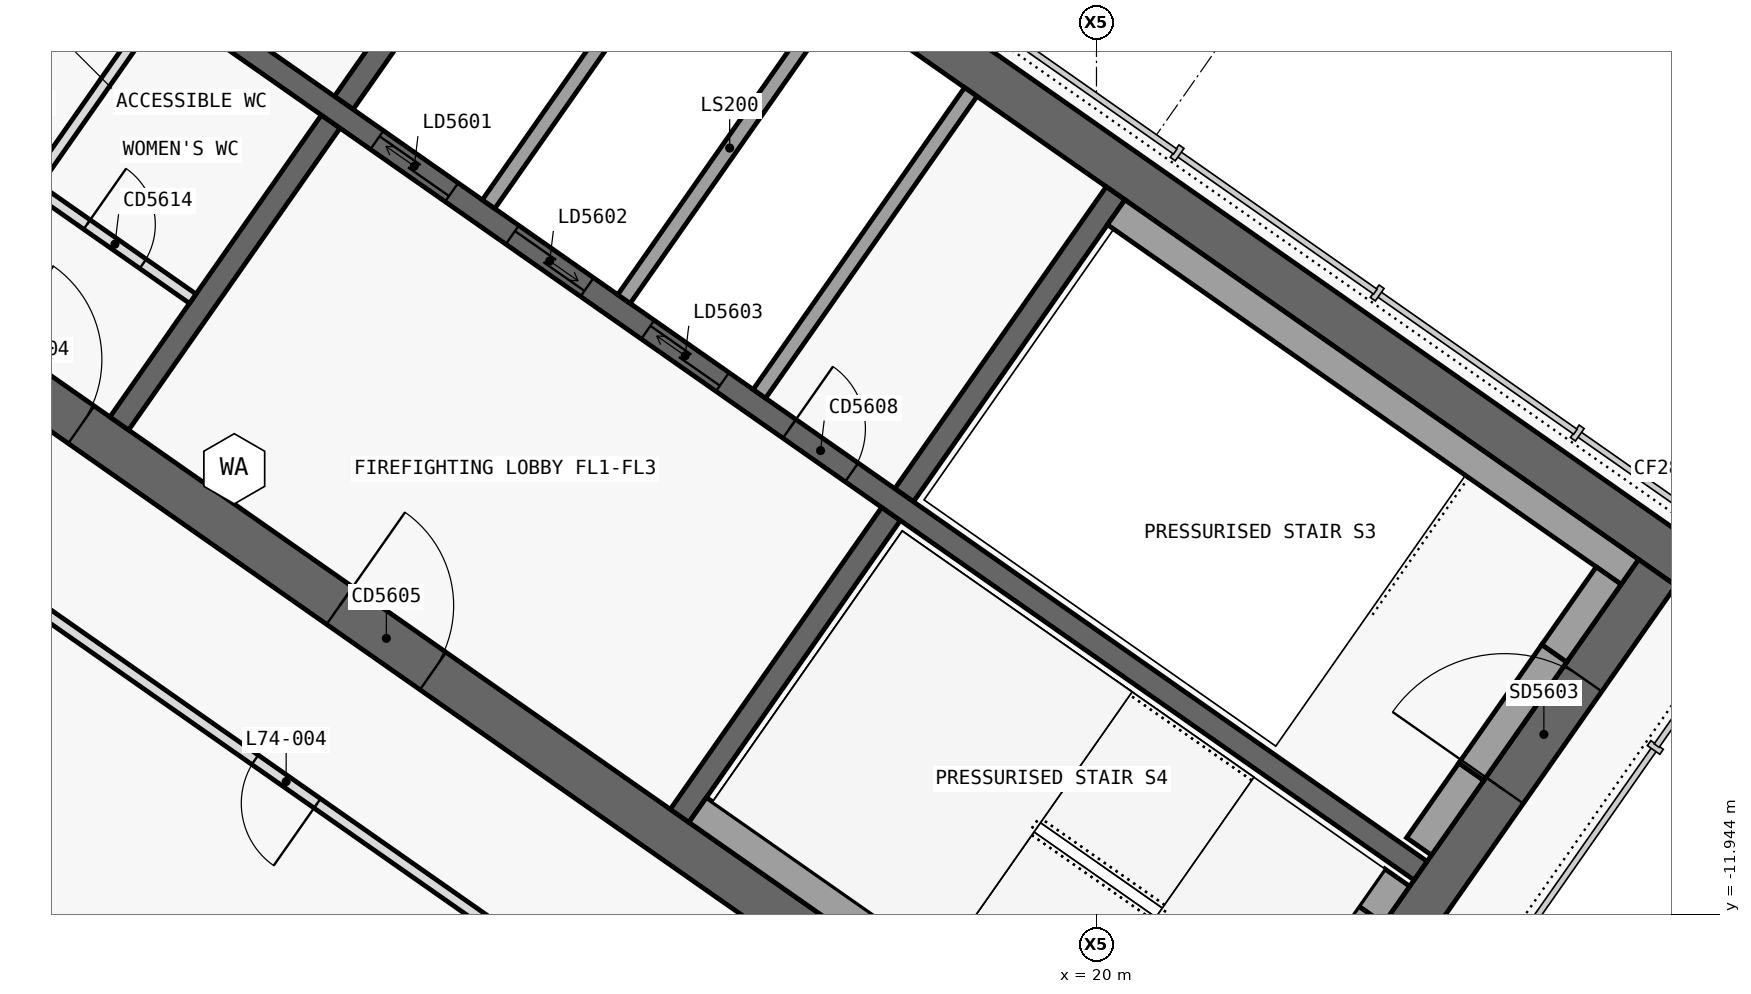
"""IFC4 building model, lengths in metres.
Left out: names, types, materials, properties, quantities, classifications, styles, units other than length and angle.
Written with IfcOpenShell. Run it as: python <this file> out.ifc"""

import sys

from ifc_helpers import new_model, si_unit, direction, frame, frame_2d, origin, place, context, subcontext, project, spatial, polyline, rectangle, outline, extrude, element, fill, save


model = new_model("IFC4")
c1 = context("Model", 3, precision=1e-05, world=origin(), true_north=direction((0.0, 1.0)))
c2 = subcontext(c1, "Body", "Model", "MODEL_VIEW")
j1 = project(units=[si_unit("LENGTHUNIT", "METRE"), si_unit("PLANEANGLEUNIT", "RADIAN")], contexts=[c1])
p1 = place(None, origin())
s1 = spatial("IfcSite", under=j1, at=p1, CompositionType="ELEMENT")
p2 = place(p1, origin())
s2 = spatial("IfcBuilding", under=s1, at=p2, CompositionType="ELEMENT")
p3 = place(p2, frame((0.0, 0.0, 313.3)))
s3 = spatial("IfcBuildingStorey", under=s2, at=p3, CompositionType="ELEMENT", Elevation=313.3)
p4 = place(p3, frame((0.028, 12.066, 0.0), z_axis=(0.0, 0.0, 1.0), x_axis=(0.819151382952, -0.573577380837, 0.0)))
e1 = element("IfcWall", 1, at=p4, inside=s3, PredefinedType="SHEAR", context=c2, shape_type="SweptSolid", body=[
    extrude(outline(polyline([(33.898, 0.3), (0.0, 0.3), (0.42, -0.3), (33.898, -0.3), (33.898, 0.3)])), origin(), (0.0, 0.0, 1.0), 5.5),
])
p5 = place(p3, frame((0.028, -0.874, 0.0), z_axis=(0.0, 0.0, 1.0), x_axis=(0.819150035022, -0.573579305871, 0.0)))
e2 = element("IfcWall", 2, at=p5, inside=s3, PredefinedType="SHEAR", context=c2, shape_type="SweptSolid", body=[
    extrude(outline(polyline([(26.476, 0.3), (0.0, 0.3), (0.42, -0.3), (26.476, -0.3), (26.476, 0.3)])), origin(), (0.0, 0.0, 1.0), 5.5),
])
p6 = place(p5, frame((6.576, 0.0, 0.0)))
e3 = element("IfcOpeningElement", 3, at=p6, cuts=e2, PredefinedType="OPENING", context=c2, shape_type="SweptSolid", body=[
    extrude(rectangle(XDim=1.5, YDim=2.1, at=frame_2d((0.75, 1.05))), frame((0.0, 0.31, 0.0), z_axis=(0.0, -1.0, 0.0), x_axis=(1.0, 0.0, 0.0)), (0.0, 0.0, 1.0), 0.62),
])
p7 = place(p5, frame((12.226, 0.0, 0.0)))
e4 = element("IfcOpeningElement", 4, at=p7, cuts=e2, PredefinedType="OPENING", context=c2, shape_type="SweptSolid", body=[
    extrude(rectangle(XDim=1.5, YDim=2.1, at=frame_2d((0.75, 1.05))), frame((0.0, 0.31, 0.0), z_axis=(0.0, -1.0, 0.0), x_axis=(1.0, 0.0, 0.0)), (0.0, 0.0, 1.0), 0.62),
])
p8 = place(p3, frame((21.642, -15.642, 0.0), z_axis=(0.0, 0.0, 1.0), x_axis=(0.573586866468, 0.819144740944, 0.0)))
e5 = element("IfcWall", 5, at=p8, inside=s3, PredefinedType="SHEAR", context=c2, shape_type="SweptSolid", body=[
    extrude(outline(polyline([(10.0, 0.3), (0.0, 0.3), (0.0, -0.3), (10.0, -0.3), (10.0, 0.3)])), origin(), (0.0, 0.0, 1.0), 5.5),
])
p9 = place(p8, frame((6.5, 0.0, 0.0)))
e6 = element("IfcOpeningElement", 6, at=p9, cuts=e5, PredefinedType="OPENING", context=c2, shape_type="SweptSolid", body=[
    extrude(rectangle(XDim=1.8, YDim=2.1, at=frame_2d((0.9, 1.05))), frame((0.0, 0.31, 0.0), z_axis=(0.0, -1.0, 0.0), x_axis=(1.0, 0.0, 0.0)), (0.0, 0.0, 1.0), 0.62),
])
p10 = place(p8, frame((2.3, 0.0, 0.0)))
e7 = element("IfcOpeningElement", 7, at=p10, cuts=e5, PredefinedType="OPENING", context=c2, shape_type="SweptSolid", body=[
    extrude(rectangle(XDim=1.8, YDim=2.1, at=frame_2d((0.9, 1.05))), frame((0.0, 0.31, 0.0), z_axis=(0.0, -1.0, 0.0), x_axis=(1.0, 0.0, 0.0)), (0.0, 0.0, 1.0), 0.62),
])
p11 = place(p3, frame((7.143, -5.49, 0.0), z_axis=(0.0, 0.0, 1.0), x_axis=(0.573617744349, 0.819123118565, 0.0)))
e8 = element("IfcWall", 8, at=p11, inside=s3, PredefinedType="SHEAR", context=c2, shape_type="SweptSolid", body=[
    extrude(outline(polyline([(0.0, 0.15), (0.0, -0.15), (4.85, -0.15), (4.85, 0.15), (0.0, 0.15)])), origin(), (0.0, 0.0, 1.0), 5.5),
])
p12 = place(p3, frame((10.097, -1.271, 0.0), z_axis=(0.0, 0.0, 1.0), x_axis=(0.573560315113, 0.819163332265, 0.0)))
e9 = element("IfcWall", 9, at=p12, inside=s3, PredefinedType="SHEAR", context=c2, shape_type="SweptSolid", body=[
    extrude(outline(polyline([(4.85, -0.15), (4.85, 0.15), (0.0, 0.15), (0.0, -0.15), (4.85, -0.15)])), origin(), (0.0, 0.0, 1.0), 5.5),
])
p13 = place(p3, frame((14.515, -10.652, 0.0), z_axis=(0.0, 0.0, 1.0), x_axis=(0.573560315113, 0.819163332265, 0.0)))
e10 = element("IfcWall", 10, at=p13, inside=s3, PredefinedType="SHEAR", context=c2, shape_type="SweptSolid", body=[
    extrude(outline(polyline([(0.0, 0.15), (0.0, -0.15), (4.85, -0.15), (4.85, 0.15), (0.0, 0.15)])), origin(), (0.0, 0.0, 1.0), 5.5),
])
p14 = place(p3, frame((17.469, -6.433, 0.0), z_axis=(0.0, 0.0, 1.0), x_axis=(0.573594092424, 0.81913968109, 0.0)))
e11 = element("IfcWall", 11, at=p14, inside=s3, PredefinedType="SHEAR", context=c2, shape_type="SweptSolid", body=[
    extrude(outline(polyline([(4.85, -0.15), (4.85, 0.15), (0.0, 0.15), (0.0, -0.15), (4.85, -0.15)])), origin(), (0.0, 0.0, 1.0), 5.5),
])
p15 = place(p3, frame((2.638, 3.768, 0.0), z_axis=(0.0, 0.0, 1.0), x_axis=(0.819155014212, -0.573572194837, 0.0)))
e12 = element("IfcWall", 12, at=p15, inside=s3, PredefinedType="SHEAR", context=c2, shape_type="SweptSolid", body=[
    extrude(outline(polyline([(0.0, 0.15), (0.0, -0.15), (26.4, -0.15), (26.4, 0.15), (0.0, 0.15)])), origin(), (0.0, 0.0, 1.0), 5.5),
])
p16 = place(p15, frame((9.637, 0.0, 0.0)))
e13 = element("IfcOpeningElement", 13, at=p16, cuts=e12, PredefinedType="OPENING", context=c2, shape_type="SweptSolid", body=[
    extrude(rectangle(XDim=1.2, YDim=2.1, at=frame_2d((0.6, 1.05))), frame((0.0, 0.16, 0.0), z_axis=(0.0, -1.0, 0.0), x_axis=(1.0, 0.0, 0.0)), (0.0, 0.0, 1.0), 0.32),
])
p17 = place(p15, frame((11.812, 0.0, 0.0)))
e14 = element("IfcOpeningElement", 14, at=p17, cuts=e12, PredefinedType="OPENING", context=c2, shape_type="SweptSolid", body=[
    extrude(rectangle(XDim=1.2, YDim=2.1, at=frame_2d((0.6, 1.05))), frame((0.0, 0.16, 0.0), z_axis=(0.0, -1.0, 0.0), x_axis=(1.0, 0.0, 0.0)), (0.0, 0.0, 1.0), 0.32),
])
p18 = place(p15, frame((13.988, 0.0, 0.0)))
e15 = element("IfcOpeningElement", 15, at=p18, cuts=e12, PredefinedType="OPENING", context=c2, shape_type="SweptSolid", body=[
    extrude(rectangle(XDim=1.2, YDim=2.1, at=frame_2d((0.6, 1.05))), frame((0.0, 0.16, 0.0), z_axis=(0.0, -1.0, 0.0), x_axis=(1.0, 0.0, 0.0)), (0.0, 0.0, 1.0), 0.32),
])
p19 = place(p15, frame((16.262, 0.0, 0.0)))
e16 = element("IfcOpeningElement", 16, at=p19, cuts=e12, PredefinedType="OPENING", context=c2, shape_type="SweptSolid", body=[
    extrude(rectangle(XDim=1.0, YDim=2.1, at=frame_2d((0.5, 1.05))), frame((0.0, 0.16, 0.0), z_axis=(0.0, -1.0, 0.0), x_axis=(1.0, 0.0, 0.0)), (0.0, 0.0, 1.0), 0.32),
])
p20 = place(p3, frame((12.001, -2.605, 0.0), z_axis=(0.0, 0.0, 1.0), x_axis=(0.573560315113, 0.819163332265, 0.0)))
e17 = element("IfcWall", 17, at=p20, inside=s3, PredefinedType="SOLIDWALL", context=c2, shape_type="SweptSolid", body=[
    extrude(rectangle(XDim=4.85, YDim=0.2, at=frame_2d((2.425, 0.0))), origin(), (0.0, 0.0, 1.0), 5.22),
])
p21 = place(p3, frame((13.783, -3.852, 0.0), z_axis=(0.0, 0.0, 1.0), x_axis=(0.573594092424, 0.81913968109, 0.0)))
e18 = element("IfcWall", 18, at=p21, inside=s3, PredefinedType="SOLIDWALL", context=c2, shape_type="SweptSolid", body=[
    extrude(rectangle(XDim=4.85, YDim=0.2, at=frame_2d((2.425, 0.0))), origin(), (0.0, 0.0, 1.0), 5.22),
])
p22 = place(p3, frame((15.565, -5.1, 0.0), z_axis=(0.0, 0.0, 1.0), x_axis=(0.573560315113, 0.819163332265, 0.0)))
e19 = element("IfcWall", 19, at=p22, inside=s3, PredefinedType="SOLIDWALL", context=c2, shape_type="SweptSolid", body=[
    extrude(rectangle(XDim=4.85, YDim=0.2, at=frame_2d((2.425, 0.0))), origin(), (0.0, 0.0, 1.0), 5.22),
])
p23 = place(p3, frame((1.516, 0.77, 0.0), z_axis=(0.0, 0.0, 1.0), x_axis=(0.819146424436, -0.573584462249, 0.0)))
e20 = element("IfcWall", 20, at=p23, inside=s3, PredefinedType="PARTITIONING", context=c2, shape_type="SweptSolid", body=[
    extrude(rectangle(XDim=8.05, YDim=0.15, at=frame_2d((4.025, 0.0))), origin(), (0.0, 0.0, 1.0), 5.22),
])
p24 = place(p23, frame((0.7, 0.0, 0.0)))
e21 = element("IfcOpeningElement", 21, at=p24, cuts=e20, PredefinedType="OPENING", context=c2, shape_type="SweptSolid", body=[
    extrude(rectangle(XDim=0.9, YDim=2.1, at=frame_2d((0.45, 1.05))), frame((0.0, 0.085, 0.0), z_axis=(0.0, -1.0, 0.0), x_axis=(1.0, 0.0, 0.0)), (0.0, 0.0, 1.0), 0.17),
])
p25 = place(p23, frame((2.6, 0.0, 0.0)))
e22 = element("IfcOpeningElement", 22, at=p25, cuts=e20, PredefinedType="OPENING", context=c2, shape_type="SweptSolid", body=[
    extrude(rectangle(XDim=0.8, YDim=2.1, at=frame_2d((0.4, 1.05))), frame((0.0, 0.085, 0.0), z_axis=(0.0, -1.0, 0.0), x_axis=(1.0, 0.0, 0.0)), (0.0, 0.0, 1.0), 0.17),
])
p26 = place(p23, frame((4.1, 0.0, 0.0)))
e23 = element("IfcOpeningElement", 23, at=p26, cuts=e20, PredefinedType="OPENING", context=c2, shape_type="SweptSolid", body=[
    extrude(rectangle(XDim=0.9, YDim=2.1, at=frame_2d((0.45, 1.05))), frame((0.0, 0.085, 0.0), z_axis=(0.0, -1.0, 0.0), x_axis=(1.0, 0.0, 0.0)), (0.0, 0.0, 1.0), 0.17),
])
p27 = place(p23, frame((6.35, 0.0, 0.0)))
e24 = element("IfcOpeningElement", 24, at=p27, cuts=e20, PredefinedType="OPENING", context=c2, shape_type="SweptSolid", body=[
    extrude(rectangle(XDim=0.9, YDim=2.1, at=frame_2d((0.45, 1.05))), frame((0.0, 0.085, 0.0), z_axis=(0.0, -1.0, 0.0), x_axis=(1.0, 0.0, 0.0)), (0.0, 0.0, 1.0), 0.17),
])
p28 = place(p3, frame((6.044, -2.309, 0.0), z_axis=(0.0, 0.0, 1.0), x_axis=(0.573564930514, 0.819160100642, 0.0)))
e25 = element("IfcWall", 25, at=p28, inside=s3, PredefinedType="PARTITIONING", context=c2, shape_type="SweptSolid", body=[
    extrude(rectangle(XDim=2.875, YDim=0.15, at=frame_2d((1.438, 0.0))), origin(), (0.0, 0.0, 1.0), 5.22),
])
p29 = place(p3, frame((20.259, -2.71, 0.0), z_axis=(0.0, 0.0, 1.0), x_axis=(0.81914849389, -0.573581506813, 0.0)))
e26 = element("IfcWall", 26, at=p29, inside=s3, PredefinedType="SOLIDWALL", context=c2, shape_type="SweptSolid", body=[
    extrude(rectangle(XDim=8.25, YDim=0.4, at=frame_2d((4.125, 0.0))), origin(), (0.0, 0.0, 1.0), 5.22),
])
p30 = place(p3, frame((24.244, -11.055, 0.0), z_axis=(0.0, 0.0, 1.0), x_axis=(0.573571582932, 0.819155442668, 0.0)))
e27 = element("IfcWall", 27, at=p30, inside=s3, PredefinedType="SOLIDWALL", context=c2, shape_type="SweptSolid", body=[
    extrude(rectangle(XDim=1.2, YDim=0.4, at=frame_2d((0.6, 0.0))), origin(), (0.0, 0.0, 1.0), 5.22),
])
p31 = place(p3, frame((26.022, -8.515, 0.0), z_axis=(0.0, 0.0, 1.0), x_axis=(0.573619628835, 0.819121798889, 0.0)))
e28 = element("IfcWall", 28, at=p31, inside=s3, PredefinedType="SOLIDWALL", context=c2, shape_type="SweptSolid", body=[
    extrude(rectangle(XDim=1.25, YDim=0.4, at=frame_2d((0.625, 0.0))), origin(), (0.0, 0.0, 1.0), 5.22),
])
p32 = place(p3, frame((24.932, -10.072, 2.15), z_axis=(0.0, 0.0, 1.0), x_axis=(0.573591692345, 0.819141361715, 0.0)))
e29 = element("IfcWall", 29, at=p32, inside=s3, PredefinedType="SOLIDWALL", context=c2, shape_type="SweptSolid", body=[
    extrude(rectangle(XDim=1.9, YDim=0.4, at=frame_2d((0.95, 0.0))), origin(), (0.0, 0.0, 1.0), 3.07),
])
p33 = place(p3, frame((14.753, -10.574, 0.0), z_axis=(0.0, 0.0, 1.0), x_axis=(0.819158229677, -0.573567602601, 0.0)))
e30 = element("IfcWall", 30, at=p33, inside=s3, PredefinedType="SOLIDWALL", context=c2, shape_type="SweptSolid", body=[
    extrude(rectangle(XDim=8.25, YDim=0.4, at=frame_2d((4.125, 0.0))), origin(), (0.0, 0.0, 1.0), 5.22),
])
p34 = place(p3, frame((23.613, -11.956, 0.0), z_axis=(0.0, 0.0, 1.0), x_axis=(0.573435029941, 0.819251039936, 0.0)))
e31 = element("IfcWall", 31, at=p34, inside=s3, PredefinedType="SOLIDWALL", context=c2, shape_type="SweptSolid", body=[
    extrude(rectangle(XDim=0.6, YDim=0.4, at=frame_2d((0.3, 0.0))), origin(), (0.0, 0.0, 1.0), 5.22),
])
p35 = place(p3, frame((22.523, -13.512, 2.15), z_axis=(0.0, 0.0, 1.0), x_axis=(0.573591692345, 0.819141361715, 0.0)))
e32 = element("IfcWall", 32, at=p35, inside=s3, PredefinedType="SOLIDWALL", context=c2, shape_type="SweptSolid", body=[
    extrude(rectangle(XDim=1.9, YDim=0.4, at=frame_2d((0.95, 0.0))), origin(), (0.0, 0.0, 1.0), 3.07),
])
p36 = place(p3, frame((13.026, -12.783, 0.0), z_axis=(0.0, 0.0, 1.0), x_axis=(-0.81915291695, 0.57357519006, 0.0)))
e33 = element("IfcWall", 33, at=p36, inside=s3, PredefinedType="PARTITIONING", context=c2, shape_type="SweptSolid", body=[
    extrude(rectangle(XDim=9.002, YDim=0.15, at=frame_2d((4.501, 0.0))), origin(), (0.0, 0.0, 1.0), 5.2),
])
p37 = place(p36, frame((4.001, 0.0, 0.0)))
e34 = element("IfcOpeningElement", 34, at=p37, cuts=e33, PredefinedType="OPENING", context=c2, shape_type="SweptSolid", body=[
    extrude(rectangle(XDim=1.0, YDim=2.1, at=frame_2d((0.5, 1.05))), frame((0.0, 0.085, 0.0), z_axis=(0.0, -1.0, 0.0), x_axis=(1.0, 0.0, 0.0)), (0.0, 0.0, 1.0), 0.17),
])
p38 = place(p16, origin())
e35 = element("IfcDoor", 35, at=p38, inside=s3, OperationType="SLIDING_TO_LEFT", PredefinedType="DOOR", context=c2, shape_type="SweptSolid", body=[
    extrude(rectangle(XDim=1.2, YDim=2.1, at=frame_2d((0.6, 1.05))), frame((0.0, 0.025, 0.0), z_axis=(0.0, -1.0, 0.0), x_axis=(1.0, 0.0, 0.0)), (0.0, 0.0, 1.0), 0.05),
])
fill(e13, e35)
p39 = place(p17, origin())
e36 = element("IfcDoor", 36, at=p39, inside=s3, OperationType="SLIDING_TO_RIGHT", PredefinedType="DOOR", context=c2, shape_type="SweptSolid", body=[
    extrude(rectangle(XDim=1.2, YDim=2.1, at=frame_2d((0.6, 1.05))), frame((0.0, 0.025, 0.0), z_axis=(0.0, -1.0, 0.0), x_axis=(1.0, 0.0, 0.0)), (0.0, 0.0, 1.0), 0.05),
])
fill(e14, e36)
p40 = place(p18, origin())
e37 = element("IfcDoor", 37, at=p40, inside=s3, OperationType="SLIDING_TO_LEFT", PredefinedType="DOOR", context=c2, shape_type="SweptSolid", body=[
    extrude(rectangle(XDim=1.2, YDim=2.1, at=frame_2d((0.6, 1.05))), frame((0.0, 0.025, 0.0), z_axis=(0.0, -1.0, 0.0), x_axis=(1.0, 0.0, 0.0)), (0.0, 0.0, 1.0), 0.05),
])
fill(e15, e37)
p41 = place(p19, origin())
e38 = element("IfcDoor", 38, at=p41, inside=s3, OperationType="SINGLE_SWING_RIGHT", PredefinedType="DOOR", context=c2, shape_type="SweptSolid", body=[
    extrude(rectangle(XDim=1.0, YDim=2.1, at=frame_2d((0.5, 1.05))), frame((0.0, 0.025, 0.0), z_axis=(0.0, -1.0, 0.0), x_axis=(1.0, 0.0, 0.0)), (0.0, 0.0, 1.0), 0.05),
])
fill(e16, e38)
p42 = place(p27, origin())
e39 = element("IfcDoor", 39, at=p42, inside=s3, OperationType="SINGLE_SWING_RIGHT", PredefinedType="DOOR", context=c2, shape_type="SweptSolid", body=[
    extrude(rectangle(XDim=0.9, YDim=2.1, at=frame_2d((0.45, 1.05))), frame((0.0, 0.025, 0.0), z_axis=(0.0, -1.0, 0.0), x_axis=(1.0, 0.0, 0.0)), (0.0, 0.0, 1.0), 0.05),
])
fill(e24, e39)
p43 = place(p6, origin())
e40 = element("IfcDoor", 40, at=p43, inside=s3, OperationType="SINGLE_SWING_RIGHT", PredefinedType="DOOR", context=c2, shape_type="SweptSolid", body=[
    extrude(rectangle(XDim=1.5, YDim=2.1, at=frame_2d((0.75, 1.05))), frame((0.0, 0.025, 0.0), z_axis=(0.0, -1.0, 0.0), x_axis=(1.0, 0.0, 0.0)), (0.0, 0.0, 1.0), 0.05),
])
fill(e3, e40)
p44 = place(p7, origin())
e41 = element("IfcDoor", 41, at=p44, inside=s3, OperationType="DOUBLE_DOOR_SINGLE_SWING", PredefinedType="DOOR", context=c2, shape_type="SweptSolid", body=[
    extrude(rectangle(XDim=1.5, YDim=2.1, at=frame_2d((0.75, 1.05))), frame((0.0, 0.025, 0.0), z_axis=(0.0, -1.0, 0.0), x_axis=(1.0, 0.0, 0.0)), (0.0, 0.0, 1.0), 0.05),
])
fill(e4, e41)
p45 = place(p9, origin())
e42 = element("IfcDoor", 42, at=p45, inside=s3, OperationType="DOUBLE_DOOR_SINGLE_SWING", PredefinedType="DOOR", context=c2, shape_type="SweptSolid", body=[
    extrude(rectangle(XDim=1.8, YDim=2.1, at=frame_2d((0.9, 1.05))), frame((0.0, 0.025, 0.0), z_axis=(0.0, -1.0, 0.0), x_axis=(1.0, 0.0, 0.0)), (0.0, 0.0, 1.0), 0.05),
])
fill(e6, e42)
p46 = place(p37, origin())
e43 = element("IfcDoor", 43, at=p46, inside=s3, OperationType="SINGLE_SWING_LEFT", PredefinedType="DOOR", context=c2, shape_type="SweptSolid", body=[
    extrude(rectangle(XDim=1.0, YDim=2.1, at=frame_2d((0.5, 1.05))), frame((0.0, 0.025, 0.0), z_axis=(0.0, -1.0, 0.0), x_axis=(1.0, 0.0, 0.0)), (0.0, 0.0, 1.0), 0.05),
])
fill(e34, e43)
save(model, sys.argv[1])
